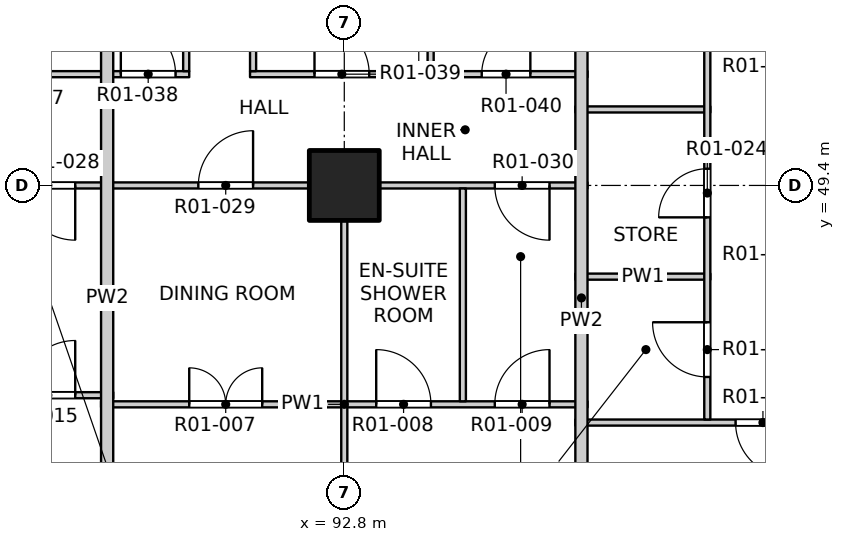
"""IFC4 building model, lengths in metres.
Left out: names, types, materials, properties, quantities, classifications, styles, units other than length and angle.
Written with IfcOpenShell. Run it as: python <this file> out.ifc"""

import sys

from ifc_helpers import new_model, si_unit, direction, frame, frame_2d, origin, origin_2d, place, context, subcontext, project, spatial, rectangle, extrude, element, fill, save


model = new_model("IFC4")
c1 = context("Model", 3, precision=1e-05, world=origin(), true_north=direction((0.0, 1.0)))
c2 = subcontext(c1, "Body", "Model", "MODEL_VIEW")
j1 = project(units=[si_unit("LENGTHUNIT", "METRE"), si_unit("PLANEANGLEUNIT", "RADIAN")], contexts=[c1])
p1 = place(None, origin())
s1 = spatial("IfcSite", under=j1, at=p1, CompositionType="ELEMENT")
p2 = place(p1, origin())
s2 = spatial("IfcBuilding", under=s1, at=p2, CompositionType="ELEMENT")
p3 = place(p2, frame((0.0, 0.0, 26.3)))
s3 = spatial("IfcBuildingStorey", under=s2, at=p3, CompositionType="ELEMENT", Elevation=26.3)
p4 = place(p3, frame((92.8, 49.4, -0.25), z_axis=(0.0, 0.0, 1.0), x_axis=(1.0, 0.0, 0.0)))
e1 = element("IfcColumn", 1, at=p4, inside=s3, PredefinedType="COLUMN", context=c2, shape_type="SweptSolid", body=[
    extrude(rectangle(XDim=1.15, YDim=1.15, at=origin_2d()), origin(), (0.0, 0.0, 1.0), 3.4),
])
p5 = place(p3, frame((96.6, 45.5, 0.0), z_axis=(0.0, 0.0, 1.0), x_axis=(1.0, 0.0, 0.0)))
e2 = element("IfcWall", 2, at=p5, inside=s3, PredefinedType="PARTITIONING", context=c2, shape_type="SweptSolid", body=[
    extrude(rectangle(XDim=11.5, YDim=0.1, at=frame_2d((5.75, 0.0))), origin(), (0.0, 0.0, 1.0), 3.15),
])
p6 = place(p5, frame((2.635, 0.0, 0.0)))
e3 = element("IfcOpeningElement", 3, at=p6, cuts=e2, PredefinedType="OPENING", context=c2, shape_type="SweptSolid", body=[
    extrude(rectangle(XDim=0.9, YDim=2.1, at=frame_2d((0.45, 1.05))), frame((0.0, 0.06, 0.0), z_axis=(0.0, -1.0, 0.0), x_axis=(1.0, 0.0, 0.0)), (0.0, 0.0, 1.0), 0.12),
])
p7 = place(p3, frame((88.8, 45.8, 0.0), z_axis=(0.0, 0.0, 1.0), x_axis=(1.0, 0.0, 0.0)))
e4 = element("IfcWall", 4, at=p7, inside=s3, PredefinedType="PARTITIONING", context=c2, shape_type="SweptSolid", body=[
    extrude(rectangle(XDim=8.0, YDim=0.1, at=frame_2d((4.0, 0.0))), origin(), (0.0, 0.0, 1.0), 3.15),
])
p8 = place(p7, frame((1.45, 0.0, 0.0)))
e5 = element("IfcOpeningElement", 5, at=p8, cuts=e4, PredefinedType="OPENING", context=c2, shape_type="SweptSolid", body=[
    extrude(rectangle(XDim=1.2, YDim=2.1, at=frame_2d((0.6, 1.05))), frame((0.0, 0.06, 0.0), z_axis=(0.0, -1.0, 0.0), x_axis=(1.0, 0.0, 0.0)), (0.0, 0.0, 1.0), 0.12),
])
p9 = place(p7, frame((4.525, 0.0, 0.0)))
e6 = element("IfcOpeningElement", 6, at=p9, cuts=e4, PredefinedType="OPENING", context=c2, shape_type="SweptSolid", body=[
    extrude(rectangle(XDim=0.9, YDim=2.1, at=frame_2d((0.45, 1.05))), frame((0.0, 0.06, 0.0), z_axis=(0.0, -1.0, 0.0), x_axis=(1.0, 0.0, 0.0)), (0.0, 0.0, 1.0), 0.12),
])
p10 = place(p7, frame((6.475, 0.0, 0.0)))
e7 = element("IfcOpeningElement", 7, at=p10, cuts=e4, PredefinedType="OPENING", context=c2, shape_type="SweptSolid", body=[
    extrude(rectangle(XDim=0.9, YDim=2.1, at=frame_2d((0.45, 1.05))), frame((0.0, 0.06, 0.0), z_axis=(0.0, -1.0, 0.0), x_axis=(1.0, 0.0, 0.0)), (0.0, 0.0, 1.0), 0.12),
])
p11 = place(p3, frame((73.2, 45.95, 0.0), z_axis=(0.0, 0.0, 1.0), x_axis=(1.0, 0.0, 0.0)))
e8 = element("IfcWall", 8, at=p11, inside=s3, PredefinedType="PARTITIONING", context=c2, shape_type="SweptSolid", body=[
    extrude(rectangle(XDim=15.8, YDim=0.1, at=frame_2d((7.9, 0.0))), origin(), (0.0, 0.0, 1.0), 3.15),
])
p12 = place(p11, frame((0.625, 0.0, 0.0)))
e9 = element("IfcOpeningElement", 9, at=p12, cuts=e8, PredefinedType="OPENING", context=c2, shape_type="SweptSolid", body=[
    extrude(rectangle(XDim=0.9, YDim=2.1, at=frame_2d((0.45, 1.05))), frame((0.0, 0.06, 0.0), z_axis=(0.0, -1.0, 0.0), x_axis=(1.0, 0.0, 0.0)), (0.0, 0.0, 1.0), 0.12),
])
p13 = place(p11, frame((2.575, 0.0, 0.0)))
e10 = element("IfcOpeningElement", 10, at=p13, cuts=e8, PredefinedType="OPENING", context=c2, shape_type="SweptSolid", body=[
    extrude(rectangle(XDim=0.9, YDim=2.1, at=frame_2d((0.45, 1.05))), frame((0.0, 0.06, 0.0), z_axis=(0.0, -1.0, 0.0), x_axis=(1.0, 0.0, 0.0)), (0.0, 0.0, 1.0), 0.12),
])
p14 = place(p11, frame((5.35, 0.0, 0.0)))
e11 = element("IfcOpeningElement", 11, at=p14, cuts=e8, PredefinedType="OPENING", context=c2, shape_type="SweptSolid", body=[
    extrude(rectangle(XDim=1.2, YDim=2.1, at=frame_2d((0.6, 1.05))), frame((0.0, 0.06, 0.0), z_axis=(0.0, -1.0, 0.0), x_axis=(1.0, 0.0, 0.0)), (0.0, 0.0, 1.0), 0.12),
])
p15 = place(p11, frame((9.25, 0.0, 0.0)))
e12 = element("IfcOpeningElement", 12, at=p15, cuts=e8, PredefinedType="OPENING", context=c2, shape_type="SweptSolid", body=[
    extrude(rectangle(XDim=1.2, YDim=2.1, at=frame_2d((0.6, 1.05))), frame((0.0, 0.06, 0.0), z_axis=(0.0, -1.0, 0.0), x_axis=(1.0, 0.0, 0.0)), (0.0, 0.0, 1.0), 0.12),
])
p16 = place(p11, frame((12.325, 0.0, 0.0)))
e13 = element("IfcOpeningElement", 13, at=p16, cuts=e8, PredefinedType="OPENING", context=c2, shape_type="SweptSolid", body=[
    extrude(rectangle(XDim=0.9, YDim=2.1, at=frame_2d((0.45, 1.05))), frame((0.0, 0.06, 0.0), z_axis=(0.0, -1.0, 0.0), x_axis=(1.0, 0.0, 0.0)), (0.0, 0.0, 1.0), 0.12),
])
p17 = place(p11, frame((14.275, 0.0, 0.0)))
e14 = element("IfcOpeningElement", 14, at=p17, cuts=e8, PredefinedType="OPENING", context=c2, shape_type="SweptSolid", body=[
    extrude(rectangle(XDim=0.9, YDim=2.1, at=frame_2d((0.45, 1.05))), frame((0.0, 0.06, 0.0), z_axis=(0.0, -1.0, 0.0), x_axis=(1.0, 0.0, 0.0)), (0.0, 0.0, 1.0), 0.12),
])
p18 = place(p3, frame((96.6, 47.9, 0.0), z_axis=(0.0, 0.0, 1.0), x_axis=(1.0, 0.0, 0.0)))
e15 = element("IfcWall", 15, at=p18, inside=s3, PredefinedType="PARTITIONING", context=c2, shape_type="SweptSolid", body=[
    extrude(rectangle(XDim=2.22, YDim=0.1, at=frame_2d((1.11, 0.0))), origin(), (0.0, 0.0, 1.0), 3.15),
])
p19 = place(p3, frame((73.2, 49.4, 0.0), z_axis=(0.0, 0.0, 1.0), x_axis=(1.0, 0.0, 0.0)))
e16 = element("IfcWall", 16, at=p19, inside=s3, PredefinedType="PARTITIONING", context=c2, shape_type="SweptSolid", body=[
    extrude(rectangle(XDim=23.6, YDim=0.1, at=frame_2d((11.8, 0.0))), origin(), (0.0, 0.0, 1.0), 3.15),
])
p20 = place(p19, frame((2.425, 0.0, 0.0)))
e17 = element("IfcOpeningElement", 17, at=p20, cuts=e16, PredefinedType="OPENING", context=c2, shape_type="SweptSolid", body=[
    extrude(rectangle(XDim=0.9, YDim=2.1, at=frame_2d((0.45, 1.05))), frame((0.0, 0.06, 0.0), z_axis=(0.0, -1.0, 0.0), x_axis=(1.0, 0.0, 0.0)), (0.0, 0.0, 1.0), 0.12),
])
p21 = place(p19, frame((5.5, 0.0, 0.0)))
e18 = element("IfcOpeningElement", 18, at=p21, cuts=e16, PredefinedType="OPENING", context=c2, shape_type="SweptSolid", body=[
    extrude(rectangle(XDim=0.9, YDim=2.1, at=frame_2d((0.45, 1.05))), frame((0.0, 0.06, 0.0), z_axis=(0.0, -1.0, 0.0), x_axis=(1.0, 0.0, 0.0)), (0.0, 0.0, 1.0), 0.12),
])
p22 = place(p19, frame((9.4, 0.0, 0.0)))
e19 = element("IfcOpeningElement", 19, at=p22, cuts=e16, PredefinedType="OPENING", context=c2, shape_type="SweptSolid", body=[
    extrude(rectangle(XDim=0.9, YDim=2.1, at=frame_2d((0.45, 1.05))), frame((0.0, 0.06, 0.0), z_axis=(0.0, -1.0, 0.0), x_axis=(1.0, 0.0, 0.0)), (0.0, 0.0, 1.0), 0.12),
])
p23 = place(p19, frame((14.275, 0.0, 0.0)))
e20 = element("IfcOpeningElement", 20, at=p23, cuts=e16, PredefinedType="OPENING", context=c2, shape_type="SweptSolid", body=[
    extrude(rectangle(XDim=0.9, YDim=2.1, at=frame_2d((0.45, 1.05))), frame((0.0, 0.06, 0.0), z_axis=(0.0, -1.0, 0.0), x_axis=(1.0, 0.0, 0.0)), (0.0, 0.0, 1.0), 0.12),
])
p24 = place(p19, frame((17.2, 0.0, 0.0)))
e21 = element("IfcOpeningElement", 21, at=p24, cuts=e16, PredefinedType="OPENING", context=c2, shape_type="SweptSolid", body=[
    extrude(rectangle(XDim=0.9, YDim=2.1, at=frame_2d((0.45, 1.05))), frame((0.0, 0.06, 0.0), z_axis=(0.0, -1.0, 0.0), x_axis=(1.0, 0.0, 0.0)), (0.0, 0.0, 1.0), 0.12),
])
p25 = place(p19, frame((22.075, 0.0, 0.0)))
e22 = element("IfcOpeningElement", 22, at=p25, cuts=e16, PredefinedType="OPENING", context=c2, shape_type="SweptSolid", body=[
    extrude(rectangle(XDim=0.9, YDim=2.1, at=frame_2d((0.45, 1.05))), frame((0.0, 0.06, 0.0), z_axis=(0.0, -1.0, 0.0), x_axis=(1.0, 0.0, 0.0)), (0.0, 0.0, 1.0), 0.12),
])
p26 = place(p3, frame((96.6, 50.65, 0.0), z_axis=(0.0, 0.0, 1.0), x_axis=(1.0, 0.0, 0.0)))
e23 = element("IfcWall", 23, at=p26, inside=s3, PredefinedType="PARTITIONING", context=c2, shape_type="SweptSolid", body=[
    extrude(rectangle(XDim=2.22, YDim=0.1, at=frame_2d((1.11, 0.0))), origin(), (0.0, 0.0, 1.0), 3.15),
])
p27 = place(p3, frame((79.5, 51.23, 0.0), z_axis=(0.0, 0.0, 1.0), x_axis=(1.0, 0.0, 0.0)))
e24 = element("IfcWall", 24, at=p27, inside=s3, PredefinedType="PARTITIONING", context=c2, shape_type="SweptSolid", body=[
    extrude(rectangle(XDim=10.75, YDim=0.1, at=frame_2d((5.375, 0.0))), origin(), (0.0, 0.0, 1.0), 3.15),
])
p28 = place(p27, frame((0.8, 0.0, 0.0)))
e25 = element("IfcOpeningElement", 25, at=p28, cuts=e24, PredefinedType="OPENING", context=c2, shape_type="SweptSolid", body=[
    extrude(rectangle(XDim=0.9, YDim=2.1, at=frame_2d((0.45, 1.05))), frame((0.0, 0.06, 0.0), z_axis=(0.0, -1.0, 0.0), x_axis=(1.0, 0.0, 0.0)), (0.0, 0.0, 1.0), 0.12),
])
p29 = place(p27, frame((3.24, 0.0, 0.0)))
e26 = element("IfcOpeningElement", 26, at=p29, cuts=e24, PredefinedType="OPENING", context=c2, shape_type="SweptSolid", body=[
    extrude(rectangle(XDim=0.8, YDim=2.1, at=frame_2d((0.4, 1.05))), frame((0.0, 0.06, 0.0), z_axis=(0.0, -1.0, 0.0), x_axis=(1.0, 0.0, 0.0)), (0.0, 0.0, 1.0), 0.12),
])
p30 = place(p27, frame((5.28, 0.0, 0.0)))
e27 = element("IfcOpeningElement", 27, at=p30, cuts=e24, PredefinedType="OPENING", context=c2, shape_type="SweptSolid", body=[
    extrude(rectangle(XDim=0.9, YDim=2.1, at=frame_2d((0.45, 1.05))), frame((0.0, 0.06, 0.0), z_axis=(0.0, -1.0, 0.0), x_axis=(1.0, 0.0, 0.0)), (0.0, 0.0, 1.0), 0.12),
])
p31 = place(p27, frame((7.565, 0.0, 0.0)))
e28 = element("IfcOpeningElement", 28, at=p31, cuts=e24, PredefinedType="OPENING", context=c2, shape_type="SweptSolid", body=[
    extrude(rectangle(XDim=0.9, YDim=2.1, at=frame_2d((0.45, 1.05))), frame((0.0, 0.06, 0.0), z_axis=(0.0, -1.0, 0.0), x_axis=(1.0, 0.0, 0.0)), (0.0, 0.0, 1.0), 0.12),
])
p32 = place(p27, frame((9.625, 0.0, 0.0)))
e29 = element("IfcOpeningElement", 29, at=p32, cuts=e24, PredefinedType="OPENING", context=c2, shape_type="SweptSolid", body=[
    extrude(rectangle(XDim=0.9, YDim=2.1, at=frame_2d((0.45, 1.05))), frame((0.0, 0.06, 0.0), z_axis=(0.0, -1.0, 0.0), x_axis=(1.0, 0.0, 0.0)), (0.0, 0.0, 1.0), 0.12),
])
p33 = place(p3, frame((91.25, 51.23, 0.0), z_axis=(0.0, 0.0, 1.0), x_axis=(1.0, 0.0, 0.0)))
e30 = element("IfcWall", 30, at=p33, inside=s3, PredefinedType="PARTITIONING", context=c2, shape_type="SweptSolid", body=[
    extrude(rectangle(XDim=5.55, YDim=0.1, at=frame_2d((2.775, 0.0))), origin(), (0.0, 0.0, 1.0), 3.15),
])
p34 = place(p33, frame((1.06, 0.0, 0.0)))
e31 = element("IfcOpeningElement", 31, at=p34, cuts=e30, PredefinedType="OPENING", context=c2, shape_type="SweptSolid", body=[
    extrude(rectangle(XDim=0.9, YDim=2.1, at=frame_2d((0.45, 1.05))), frame((0.0, 0.06, 0.0), z_axis=(0.0, -1.0, 0.0), x_axis=(1.0, 0.0, 0.0)), (0.0, 0.0, 1.0), 0.12),
])
p35 = place(p33, frame((3.81, 0.0, 0.0)))
e32 = element("IfcOpeningElement", 32, at=p35, cuts=e30, PredefinedType="OPENING", context=c2, shape_type="SweptSolid", body=[
    extrude(rectangle(XDim=0.8, YDim=2.1, at=frame_2d((0.4, 1.05))), frame((0.0, 0.06, 0.0), z_axis=(0.0, -1.0, 0.0), x_axis=(1.0, 0.0, 0.0)), (0.0, 0.0, 1.0), 0.12),
])
p36 = place(p3, frame((88.9, 41.9, 0.0), z_axis=(0.0, 0.0, 1.0), x_axis=(0.0, 1.0, 0.0)))
e33 = element("IfcWall", 33, at=p36, inside=s3, PredefinedType="PARTITIONING", context=c2, shape_type="SweptSolid", body=[
    extrude(rectangle(XDim=11.3, YDim=0.2, at=frame_2d((5.65, 0.0))), origin(), (0.0, 0.0, 1.0), 3.15),
])
for number, where, z_axis, x_axis in (
    (34, (90.2, 51.28, 0.0), (0.0, 0.0, 1.0), (0.0, 1.0, 0.0)),
    (35, (91.3, 51.28, 0.0), (0.0, 0.0, 1.0), (0.0, 1.0, 0.0)),
):
    element("IfcWall", number, at=place(p3, frame(where, z_axis=z_axis, x_axis=x_axis)), inside=s3, PredefinedType="PARTITIONING", context=c2, shape_type="SweptSolid", body=[
        extrude(rectangle(XDim=1.92, YDim=0.1, at=frame_2d((0.96, 0.0))), origin(), (0.0, 0.0, 1.0), 3.15),
    ])
p37 = place(p3, frame((92.8, 41.9, 0.0), z_axis=(0.0, 0.0, 1.0), x_axis=(0.0, 1.0, 0.0)))
e36 = element("IfcWall", 36, at=p37, inside=s3, PredefinedType="PARTITIONING", context=c2, shape_type="SweptSolid", body=[
    extrude(rectangle(XDim=7.45, YDim=0.1, at=frame_2d((3.725, 0.0))), origin(), (0.0, 0.0, 1.0), 2.55),
])
p38 = place(p3, frame((94.22, 51.28, 0.0), z_axis=(0.0, 0.0, 1.0), x_axis=(0.0, 1.0, 0.0)))
e37 = element("IfcWall", 37, at=p38, inside=s3, PredefinedType="PARTITIONING", context=c2, shape_type="SweptSolid", body=[
    extrude(rectangle(XDim=1.92, YDim=0.1, at=frame_2d((0.96, 0.0))), origin(), (0.0, 0.0, 1.0), 3.15),
])
p39 = place(p3, frame((94.75, 45.85, 0.0), z_axis=(0.0, 0.0, 1.0), x_axis=(0.0, 1.0, 0.0)))
e38 = element("IfcWall", 38, at=p39, inside=s3, PredefinedType="PARTITIONING", context=c2, shape_type="SweptSolid", body=[
    extrude(rectangle(XDim=3.5, YDim=0.1, at=frame_2d((1.75, 0.0))), origin(), (0.0, 0.0, 1.0), 3.15),
])
p40 = place(p3, frame((96.7, 41.9, 0.0), z_axis=(0.0, 0.0, 1.0), x_axis=(0.0, 1.0, 0.0)))
e39 = element("IfcWall", 39, at=p40, inside=s3, PredefinedType="PARTITIONING", context=c2, shape_type="SweptSolid", body=[
    extrude(rectangle(XDim=11.3, YDim=0.2, at=frame_2d((5.65, 0.0))), origin(), (0.0, 0.0, 1.0), 3.15),
])
p41 = place(p3, frame((98.77, 45.55, 0.0), z_axis=(0.0, 0.0, 1.0), x_axis=(0.0, 1.0, 0.0)))
e40 = element("IfcWall", 40, at=p41, inside=s3, PredefinedType="PARTITIONING", context=c2, shape_type="SweptSolid", body=[
    extrude(rectangle(XDim=12.1, YDim=0.1, at=frame_2d((6.05, 0.0))), origin(), (0.0, 0.0, 1.0), 3.15),
])
p42 = place(p41, frame((0.7, 0.0, 0.0)))
e41 = element("IfcOpeningElement", 41, at=p42, cuts=e40, PredefinedType="OPENING", context=c2, shape_type="SweptSolid", body=[
    extrude(rectangle(XDim=0.9, YDim=2.1, at=frame_2d((0.45, 1.05))), frame((0.0, 0.06, 0.0), z_axis=(0.0, -1.0, 0.0), x_axis=(1.0, 0.0, 0.0)), (0.0, 0.0, 1.0), 0.12),
])
p43 = place(p41, frame((3.325, 0.0, 0.0)))
e42 = element("IfcOpeningElement", 42, at=p43, cuts=e40, PredefinedType="OPENING", context=c2, shape_type="SweptSolid", body=[
    extrude(rectangle(XDim=0.8, YDim=2.1, at=frame_2d((0.4, 1.05))), frame((0.0, 0.06, 0.0), z_axis=(0.0, -1.0, 0.0), x_axis=(1.0, 0.0, 0.0)), (0.0, 0.0, 1.0), 0.12),
])
p44 = place(p41, frame((6.15, 0.0, 0.0)))
e43 = element("IfcOpeningElement", 43, at=p44, cuts=e40, PredefinedType="OPENING", context=c2, shape_type="SweptSolid", body=[
    extrude(rectangle(XDim=0.8, YDim=2.1, at=frame_2d((0.4, 1.05))), frame((0.0, 0.06, 0.0), z_axis=(0.0, -1.0, 0.0), x_axis=(1.0, 0.0, 0.0)), (0.0, 0.0, 1.0), 0.12),
])
p45 = place(p41, frame((8.75, 0.0, 0.0)))
e44 = element("IfcOpeningElement", 44, at=p45, cuts=e40, PredefinedType="OPENING", context=c2, shape_type="SweptSolid", body=[
    extrude(rectangle(XDim=0.8, YDim=2.1, at=frame_2d((0.4, 1.05))), frame((0.0, 0.06, 0.0), z_axis=(0.0, -1.0, 0.0), x_axis=(1.0, 0.0, 0.0)), (0.0, 0.0, 1.0), 0.12),
])
p46 = place(p41, frame((10.775, 0.0, 0.0)))
e45 = element("IfcOpeningElement", 45, at=p46, cuts=e40, PredefinedType="OPENING", context=c2, shape_type="SweptSolid", body=[
    extrude(rectangle(XDim=0.9, YDim=2.1, at=frame_2d((0.45, 1.05))), frame((0.0, 0.06, 0.0), z_axis=(0.0, -1.0, 0.0), x_axis=(1.0, 0.0, 0.0)), (0.0, 0.0, 1.0), 0.12),
])
p47 = place(p6, origin())
e46 = element("IfcDoor", 46, at=p47, inside=s3, OperationType="SINGLE_SWING_LEFT", PredefinedType="DOOR", context=c2, shape_type="SweptSolid", body=[
    extrude(rectangle(XDim=0.9, YDim=2.1, at=frame_2d((0.45, 1.05))), frame((0.0, 0.025, 0.0), z_axis=(0.0, -1.0, 0.0), x_axis=(1.0, 0.0, 0.0)), (0.0, 0.0, 1.0), 0.05),
])
fill(e3, e46)
p48 = place(p8, origin())
e47 = element("IfcDoor", 47, at=p48, inside=s3, OperationType="DOUBLE_DOOR_SINGLE_SWING", PredefinedType="DOOR", context=c2, shape_type="SweptSolid", body=[
    extrude(rectangle(XDim=1.2, YDim=2.1, at=frame_2d((0.6, 1.05))), frame((0.0, 0.025, 0.0), z_axis=(0.0, -1.0, 0.0), x_axis=(1.0, 0.0, 0.0)), (0.0, 0.0, 1.0), 0.05),
])
fill(e5, e47)
p49 = place(p9, origin())
e48 = element("IfcDoor", 48, at=p49, inside=s3, OperationType="SINGLE_SWING_LEFT", PredefinedType="DOOR", context=c2, shape_type="SweptSolid", body=[
    extrude(rectangle(XDim=0.9, YDim=2.1, at=frame_2d((0.45, 1.05))), frame((0.0, 0.025, 0.0), z_axis=(0.0, -1.0, 0.0), x_axis=(1.0, 0.0, 0.0)), (0.0, 0.0, 1.0), 0.05),
])
fill(e6, e48)
p50 = place(p10, origin())
e49 = element("IfcDoor", 49, at=p50, inside=s3, OperationType="SINGLE_SWING_RIGHT", PredefinedType="DOOR", context=c2, shape_type="SweptSolid", body=[
    extrude(rectangle(XDim=0.9, YDim=2.1, at=frame_2d((0.45, 1.05))), frame((0.0, 0.025, 0.0), z_axis=(0.0, -1.0, 0.0), x_axis=(1.0, 0.0, 0.0)), (0.0, 0.0, 1.0), 0.05),
])
fill(e7, e49)
p51 = place(p17, origin())
e50 = element("IfcDoor", 50, at=p51, inside=s3, OperationType="SINGLE_SWING_RIGHT", PredefinedType="DOOR", context=c2, shape_type="SweptSolid", body=[
    extrude(rectangle(XDim=0.9, YDim=2.1, at=frame_2d((0.45, 1.05))), frame((0.0, 0.025, 0.0), z_axis=(0.0, -1.0, 0.0), x_axis=(1.0, 0.0, 0.0)), (0.0, 0.0, 1.0), 0.05),
])
fill(e14, e50)
p52 = place(p42, origin())
e51 = element("IfcDoor", 51, at=p52, inside=s3, OperationType="SINGLE_SWING_RIGHT", PredefinedType="DOOR", context=c2, shape_type="SweptSolid", body=[
    extrude(rectangle(XDim=0.9, YDim=2.1, at=frame_2d((0.45, 1.05))), frame((0.0, 0.025, 0.0), z_axis=(0.0, -1.0, 0.0), x_axis=(1.0, 0.0, 0.0)), (0.0, 0.0, 1.0), 0.05),
])
fill(e41, e51)
p53 = place(p43, origin())
e52 = element("IfcDoor", 52, at=p53, inside=s3, OperationType="SINGLE_SWING_LEFT", PredefinedType="DOOR", context=c2, shape_type="SweptSolid", body=[
    extrude(rectangle(XDim=0.8, YDim=2.1, at=frame_2d((0.4, 1.05))), frame((0.0, 0.025, 0.0), z_axis=(0.0, -1.0, 0.0), x_axis=(1.0, 0.0, 0.0)), (0.0, 0.0, 1.0), 0.05),
])
fill(e42, e52)
p54 = place(p23, origin())
e53 = element("IfcDoor", 53, at=p54, inside=s3, OperationType="SINGLE_SWING_LEFT", PredefinedType="DOOR", context=c2, shape_type="SweptSolid", body=[
    extrude(rectangle(XDim=0.9, YDim=2.1, at=frame_2d((0.45, 1.05))), frame((0.0, 0.025, 0.0), z_axis=(0.0, -1.0, 0.0), x_axis=(1.0, 0.0, 0.0)), (0.0, 0.0, 1.0), 0.05),
])
fill(e20, e53)
p55 = place(p24, origin())
e54 = element("IfcDoor", 54, at=p55, inside=s3, OperationType="SINGLE_SWING_RIGHT", PredefinedType="DOOR", context=c2, shape_type="SweptSolid", body=[
    extrude(rectangle(XDim=0.9, YDim=2.1, at=frame_2d((0.45, 1.05))), frame((0.0, 0.025, 0.0), z_axis=(0.0, -1.0, 0.0), x_axis=(1.0, 0.0, 0.0)), (0.0, 0.0, 1.0), 0.05),
])
fill(e21, e54)
p56 = place(p25, origin())
e55 = element("IfcDoor", 55, at=p56, inside=s3, OperationType="SINGLE_SWING_LEFT", PredefinedType="DOOR", context=c2, shape_type="SweptSolid", body=[
    extrude(rectangle(XDim=0.9, YDim=2.1, at=frame_2d((0.45, 1.05))), frame((0.0, 0.025, 0.0), z_axis=(0.0, -1.0, 0.0), x_axis=(1.0, 0.0, 0.0)), (0.0, 0.0, 1.0), 0.05),
])
fill(e22, e55)
p57 = place(p32, origin())
e56 = element("IfcDoor", 56, at=p57, inside=s3, OperationType="SINGLE_SWING_LEFT", PredefinedType="DOOR", context=c2, shape_type="SweptSolid", body=[
    extrude(rectangle(XDim=0.9, YDim=2.1, at=frame_2d((0.45, 1.05))), frame((0.0, 0.025, 0.0), z_axis=(0.0, -1.0, 0.0), x_axis=(1.0, 0.0, 0.0)), (0.0, 0.0, 1.0), 0.05),
])
fill(e29, e56)
p58 = place(p34, origin())
e57 = element("IfcDoor", 57, at=p58, inside=s3, OperationType="SINGLE_SWING_LEFT", PredefinedType="DOOR", context=c2, shape_type="SweptSolid", body=[
    extrude(rectangle(XDim=0.9, YDim=2.1, at=frame_2d((0.45, 1.05))), frame((0.0, 0.025, 0.0), z_axis=(0.0, -1.0, 0.0), x_axis=(1.0, 0.0, 0.0)), (0.0, 0.0, 1.0), 0.05),
])
fill(e31, e57)
p59 = place(p35, origin())
e58 = element("IfcDoor", 58, at=p59, inside=s3, OperationType="SINGLE_SWING_RIGHT", PredefinedType="DOOR", context=c2, shape_type="SweptSolid", body=[
    extrude(rectangle(XDim=0.8, YDim=2.1, at=frame_2d((0.4, 1.05))), frame((0.0, 0.025, 0.0), z_axis=(0.0, -1.0, 0.0), x_axis=(1.0, 0.0, 0.0)), (0.0, 0.0, 1.0), 0.05),
])
fill(e32, e58)
save(model, sys.argv[1])
